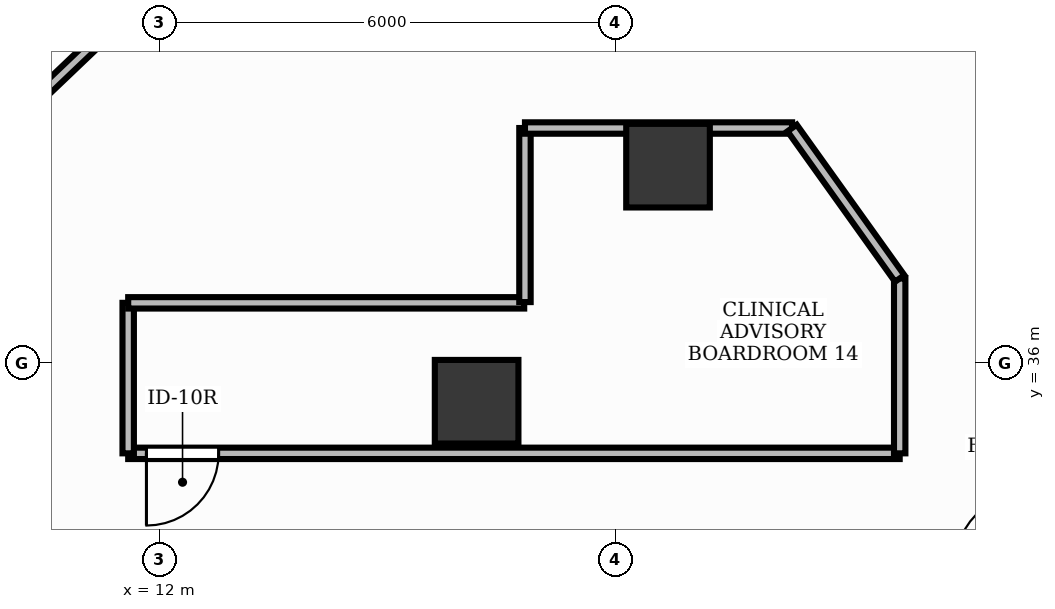
"""IFC4 building model, lengths in metres.
Left out: names, types, materials, properties, quantities, classifications, styles, units other than length and angle.
Written with IfcOpenShell. Run it as: python <this file> out.ifc"""

import sys

from ifc_helpers import new_model, si_unit, direction, frame, frame_2d, origin, origin_2d, place, context, subcontext, project, spatial, rectangle, extrude, element, fill, save


model = new_model("IFC4")
c1 = context("Model", 3, precision=1e-05, world=origin(), true_north=direction((0.0, 1.0)))
c2 = subcontext(c1, "Body", "Model", "MODEL_VIEW")
j1 = project(units=[si_unit("LENGTHUNIT", "METRE"), si_unit("PLANEANGLEUNIT", "RADIAN")], contexts=[c1])
p1 = place(None, origin())
s1 = spatial("IfcSite", under=j1, at=p1, CompositionType="ELEMENT")
p2 = place(p1, origin())
s2 = spatial("IfcBuilding", under=s1, at=p2, CompositionType="ELEMENT")
p3 = place(p2, frame((0.0, 0.0, 38.4)))
s3 = spatial("IfcBuildingStorey", under=s2, at=p3, CompositionType="ELEMENT", Elevation=38.4)
for number, where, z_axis, x_axis in (
    (1, (18.692, 38.595, -0.0), (0.0, 0.0, 1.0), (1.0, 0.0, 0.0)),
    (2, (16.174, 35.489, -0.0), (0.0, 0.0, 1.0), (1.0, 0.0, 0.0)),
):
    element("IfcColumn", number, at=place(p3, frame(where, z_axis=z_axis, x_axis=x_axis)), inside=s3, PredefinedType="COLUMN", context=c2, shape_type="SweptSolid", body=[
        extrude(rectangle(XDim=1.1, YDim=1.1, at=origin_2d()), origin(), (0.0, 0.0, 1.0), 3.901),
    ])
p4 = place(p3, frame((21.74, 34.81, 0.0), z_axis=(0.0, 0.0, 1.0), x_axis=(-1.0, 0.0, 0.0)))
e3 = element("IfcWall", 3, at=p4, inside=s3, PredefinedType="PARTITIONING", context=c2, shape_type="SweptSolid", body=[
    extrude(rectangle(XDim=10.15, YDim=0.15, at=frame_2d((5.075, 0.0))), origin(), (0.0, 0.0, 1.0), 2.91),
])
p5 = place(p4, frame((8.96, 0.0, 0.0)))
e4 = element("IfcOpeningElement", 4, at=p5, cuts=e3, PredefinedType="OPENING", context=c2, shape_type="SweptSolid", body=[
    extrude(rectangle(XDim=0.95, YDim=2.15, at=frame_2d((0.475, 1.075))), frame((0.0, 0.09, 0.0), z_axis=(0.0, -1.0, 0.0), x_axis=(1.0, 0.0, 0.0)), (0.0, 0.0, 1.0), 0.18),
])
p6 = place(p3, frame((21.74, 37.111, 0.0), z_axis=(0.0, 0.0, 1.0), x_axis=(0.0, -1.0, 0.0)))
e5 = element("IfcWall", 5, at=p6, inside=s3, PredefinedType="PARTITIONING", context=c2, shape_type="SweptSolid", body=[
    extrude(rectangle(XDim=2.301, YDim=0.15, at=frame_2d((1.15, 0.0))), origin(), (0.0, 0.0, 1.0), 2.91),
])
p7 = place(p3, frame((11.59, 34.81, 0.0), z_axis=(0.0, 0.0, 1.0), x_axis=(0.0, 1.0, 0.0)))
e6 = element("IfcWall", 6, at=p7, inside=s3, PredefinedType="PARTITIONING", context=c2, shape_type="SweptSolid", body=[
    extrude(rectangle(XDim=1.98, YDim=0.15, at=frame_2d((0.99, 0.0))), origin(), (0.0, 0.0, 1.0), 2.91),
])
p8 = place(p3, frame((11.59, 36.79, 0.0), z_axis=(0.0, 0.0, 1.0), x_axis=(1.0, 0.0, 0.0)))
e7 = element("IfcWall", 7, at=p8, inside=s3, PredefinedType="PARTITIONING", context=c2, shape_type="SweptSolid", body=[
    extrude(rectangle(XDim=5.21, YDim=0.15, at=frame_2d((2.605, 0.0))), origin(), (0.0, 0.0, 1.0), 2.91),
])
p9 = place(p3, frame((16.81, 36.8, 0.0), z_axis=(0.0, 0.0, 1.0), x_axis=(0.0, 1.0, 0.0)))
e8 = element("IfcWall", 8, at=p9, inside=s3, PredefinedType="PARTITIONING", context=c2, shape_type="SweptSolid", body=[
    extrude(rectangle(XDim=2.29, YDim=0.15, at=frame_2d((1.145, 0.0))), origin(), (0.0, 0.0, 1.0), 2.91),
])
p10 = place(p3, frame((16.81, 39.09, 0.0), z_axis=(0.0, 0.0, 1.0), x_axis=(1.0, 0.0, 0.0)))
e9 = element("IfcWall", 9, at=p10, inside=s3, PredefinedType="PARTITIONING", context=c2, shape_type="SweptSolid", body=[
    extrude(rectangle(XDim=3.515, YDim=0.15, at=frame_2d((1.757, 0.0))), origin(), (0.0, 0.0, 1.0), 2.91),
])
p11 = place(p3, frame((20.325, 39.09, 0.0), z_axis=(0.0, 0.0, 1.0), x_axis=(0.581703214005, -0.813401113115, 0.0)))
e10 = element("IfcWall", 10, at=p11, inside=s3, PredefinedType="PARTITIONING", context=c2, shape_type="SweptSolid", body=[
    extrude(rectangle(XDim=2.433, YDim=0.15, at=frame_2d((1.217, 0.0))), origin(), (0.0, 0.0, 1.0), 2.91),
])
p12 = place(p3, frame((11.307, 40.358, 0.0), z_axis=(0.0, 0.0, 1.0), x_axis=(-0.723655021688, -0.690161872017, 0.0)))
e11 = element("IfcWall", 11, at=p12, inside=s3, PredefinedType="PARTITIONING", context=c2, shape_type="SweptSolid", body=[
    extrude(rectangle(XDim=2.406, YDim=0.15, at=frame_2d((1.203, 0.0))), origin(), (0.0, 0.0, 1.0), 2.91),
])
p13 = place(p5, origin())
e12 = element("IfcDoor", 12, at=p13, inside=s3, OperationType="SINGLE_SWING_RIGHT", PredefinedType="DOOR", context=c2, shape_type="SweptSolid", body=[
    extrude(rectangle(XDim=0.95, YDim=2.15, at=frame_2d((0.475, 1.075))), frame((0.0, 0.025, 0.0), z_axis=(0.0, -1.0, 0.0), x_axis=(1.0, 0.0, 0.0)), (0.0, 0.0, 1.0), 0.05),
])
fill(e4, e12)
save(model, sys.argv[1])
